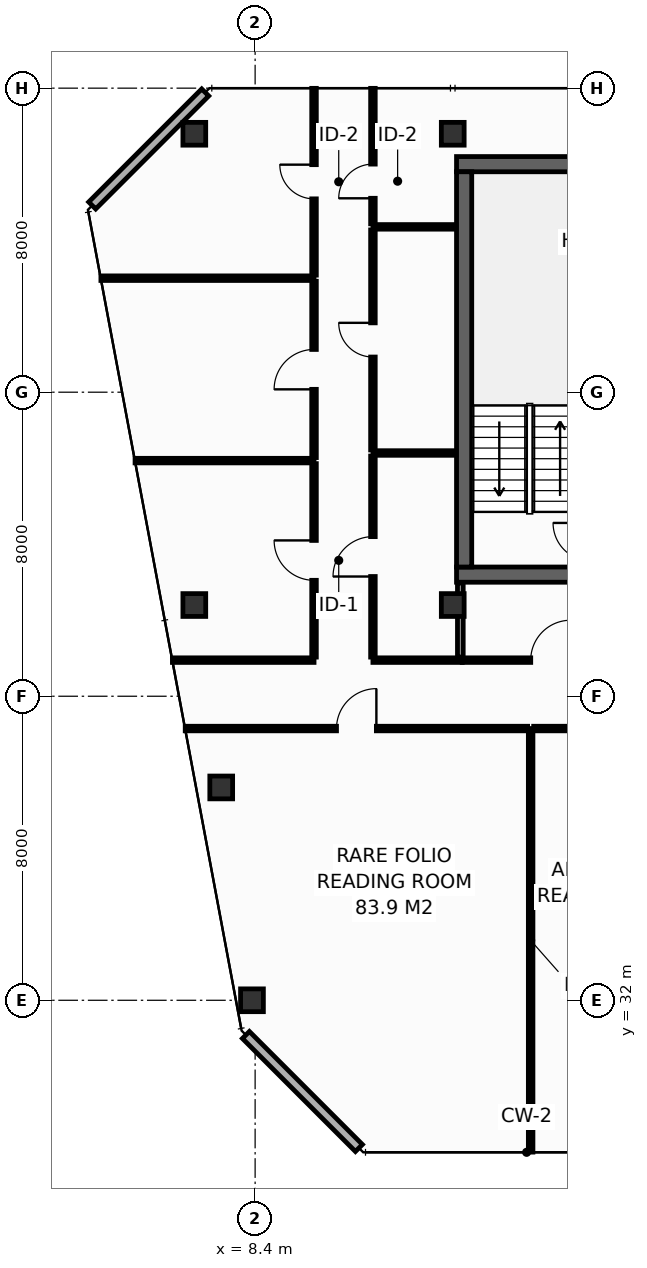
"""IFC4 building model, lengths in metres.
Left out: names, types, materials, properties, quantities, classifications, styles, units other than length and angle.
Written with IfcOpenShell. Run it as: python <this file> out.ifc"""

import sys

from ifc_helpers import new_model, si_unit, direction, frame, frame_2d, origin, origin_2d, place, context, subcontext, project, spatial, rectangle, hollow_rectangle, extrude, element, fill, save


model = new_model("IFC4")
c1 = context("Model", 3, precision=1e-05, world=origin(), true_north=direction((0.0, 1.0)))
c2 = subcontext(c1, "Body", "Model", "MODEL_VIEW")
j1 = project(units=[si_unit("LENGTHUNIT", "METRE"), si_unit("PLANEANGLEUNIT", "RADIAN")], contexts=[c1])
p1 = place(None, origin())
s1 = spatial("IfcSite", under=j1, at=p1, CompositionType="ELEMENT")
p2 = place(p1, origin())
s2 = spatial("IfcBuilding", under=s1, at=p2, CompositionType="ELEMENT")
p3 = place(p2, frame((0.0, 0.0, 283.8)))
s3 = spatial("IfcBuildingStorey", under=s2, at=p3, CompositionType="ELEMENT", Elevation=283.8)
p4 = place(p3, frame((13.7, 43.2, 0.0), z_axis=(0.0, 0.0, 1.0), x_axis=(1.0, 0.0, 0.0)))
e1 = element("IfcWall", 1, at=p4, inside=s3, PredefinedType="SHEAR", context=c2, shape_type="SweptSolid", body=[
    extrude(rectangle(XDim=32.5, YDim=0.4, at=frame_2d((16.25, 0.0))), origin(), (0.0, 0.0, 1.0), 3.55),
])
p5 = place(p4, frame((5.4, 0.0, 0.0)))
e2 = element("IfcOpeningElement", 2, at=p5, cuts=e1, PredefinedType="OPENING", context=c2, shape_type="SweptSolid", body=[
    extrude(rectangle(XDim=1.1, YDim=2.15, at=frame_2d((0.55, 1.075))), frame((0.0, 0.21, 0.0), z_axis=(0.0, -1.0, 0.0), x_axis=(1.0, 0.0, 0.0)), (0.0, 0.0, 1.0), 0.42),
])
p6 = place(p4, frame((25.6, 0.0, 0.0)))
e3 = element("IfcOpeningElement", 3, at=p6, cuts=e1, PredefinedType="OPENING", context=c2, shape_type="SweptSolid", body=[
    extrude(rectangle(XDim=1.1, YDim=2.15, at=frame_2d((0.55, 1.075))), frame((0.0, 0.21, 0.0), z_axis=(0.0, -1.0, 0.0), x_axis=(1.0, 0.0, 0.0)), (0.0, 0.0, 1.0), 0.42),
])
p7 = place(p3, frame((13.7, 54.0, 0.0), z_axis=(0.0, 0.0, 1.0), x_axis=(1.0, 0.0, 0.0)))
e4 = element("IfcWall", 4, at=p7, inside=s3, PredefinedType="SHEAR", context=c2, shape_type="SweptSolid", body=[
    extrude(rectangle(XDim=32.5, YDim=0.4, at=frame_2d((16.25, 0.0))), origin(), (0.0, 0.0, 1.0), 3.55),
])
p8 = place(p3, frame((13.9, 43.4, 0.0), z_axis=(0.0, 0.0, 1.0), x_axis=(0.0, 1.0, 0.0)))
e5 = element("IfcWall", 5, at=p8, inside=s3, PredefinedType="SHEAR", context=c2, shape_type="SweptSolid", body=[
    extrude(rectangle(XDim=10.4, YDim=0.4, at=frame_2d((5.2, 0.0))), origin(), (0.0, 0.0, 1.0), 3.55),
])
for number, where, z_axis, x_axis in (
    (6, (6.8, 54.8, 0.0), (0.0, 0.0, 1.0), (1.0, 0.0, 0.0)),
    (7, (13.6, 54.8, 0.0), (0.0, 0.0, 1.0), (1.0, 0.0, 0.0)),
    (8, (6.8, 42.4, 0.0), (0.0, 0.0, 1.0), (1.0, 0.0, 0.0)),
    (9, (13.6, 42.4, 0.0), (0.0, 0.0, 1.0), (1.0, 0.0, 0.0)),
    (10, (8.317, 32.0, 0.0), (0.0, 0.0, 1.0), (1.0, 0.0, 0.0)),
    (11, (7.508, 37.6, 0.0), (0.0, 0.0, 1.0), (1.0, 0.0, 0.0)),
):
    element("IfcColumn", number, at=place(p3, frame(where, z_axis=z_axis, x_axis=x_axis)), inside=s3, PredefinedType="COLUMN", context=c2, shape_type="SweptSolid", body=[
        extrude(hollow_rectangle(XDim=0.6, YDim=0.6, WallThickness=0.028, at=origin_2d()), origin(), (0.0, 0.0, 1.0), 3.8),
    ])
for number, where, z_axis, x_axis in (
    (12, (8.157, 31.087, 0.0), (0.0, 0.0, 1.0), (0.707, -0.707, 0.0)),
    (13, (7.087, 55.887, 0.0), (0.0, 0.0, 1.0), (-0.707, -0.707, 0.0)),
):
    element("IfcWall", number, at=place(p3, frame(where, z_axis=z_axis, x_axis=x_axis)), inside=s3, PredefinedType="STANDARD", context=c2, shape_type="SweptSolid", body=[
        extrude(rectangle(XDim=4.206, YDim=0.26, at=frame_2d((2.103, 0.0))), origin(), (0.0, 0.0, 1.0), 3.55),
    ])
p9 = place(p3, frame((6.224, 40.95, 0.0), z_axis=(0.0, 0.0, 1.0), x_axis=(1.0, 0.0, 0.0)))
e14 = element("IfcWall", 14, at=p9, inside=s3, PredefinedType="PARTITIONING", context=c2, shape_type="SweptSolid", body=[
    extrude(rectangle(XDim=3.726, YDim=0.12, at=frame_2d((1.863, 0.0))), origin(), (0.0, 0.0, 1.0), 3.085),
])
p10 = place(p3, frame((11.5, 40.95, 0.0), z_axis=(0.0, 0.0, 1.0), x_axis=(1.0, 0.0, 0.0)))
e15 = element("IfcWall", 15, at=p10, inside=s3, PredefinedType="PARTITIONING", context=c2, shape_type="SweptSolid", body=[
    extrude(rectangle(XDim=2.35, YDim=0.12, at=frame_2d((1.175, 0.0))), origin(), (0.0, 0.0, 1.0), 3.55),
])
p11 = place(p3, frame((11.5, 52.35, 0.0), z_axis=(0.0, 0.0, 1.0), x_axis=(1.0, 0.0, 0.0)))
e16 = element("IfcWall", 16, at=p11, inside=s3, PredefinedType="PARTITIONING", context=c2, shape_type="SweptSolid", body=[
    extrude(rectangle(XDim=2.18, YDim=0.12, at=frame_2d((1.09, 0.0))), origin(), (0.0, 0.0, 1.0), 3.55),
])
p12 = place(p3, frame((11.5, 52.43, 0.0), z_axis=(0.0, 0.0, 1.0), x_axis=(0.0, 1.0, 0.0)))
e17 = element("IfcWall", 17, at=p12, inside=s3, PredefinedType="PARTITIONING", context=c2, shape_type="SweptSolid", body=[
    extrude(rectangle(XDim=3.565, YDim=0.12, at=frame_2d((1.783, 0.0))), origin(), (0.0, 0.0, 1.0), 2.935),
])
p13 = place(p12, frame((0.672, 0.0, 0.0)))
e18 = element("IfcOpeningElement", 18, at=p13, cuts=e17, PredefinedType="OPENING", context=c2, shape_type="SweptSolid", body=[
    extrude(rectangle(XDim=0.9, YDim=2.1, at=frame_2d((0.45, 1.05))), frame((0.0, 0.07, 0.0), z_axis=(0.0, -1.0, 0.0), x_axis=(1.0, 0.0, 0.0)), (0.0, 0.0, 1.0), 0.14),
])
p14 = place(p3, frame((5.241, 46.2, 0.0), z_axis=(0.0, 0.0, 1.0), x_axis=(1.0, 0.0, 0.0)))
e19 = element("IfcWall", 19, at=p14, inside=s3, PredefinedType="PARTITIONING", context=c2, shape_type="SweptSolid", body=[
    extrude(rectangle(XDim=4.709, YDim=0.12, at=frame_2d((2.354, 0.0))), origin(), (0.0, 0.0, 1.0), 2.947),
])
p15 = place(p3, frame((4.342, 51.0, 0.0), z_axis=(0.0, 0.0, 1.0), x_axis=(1.0, 0.0, 0.0)))
e20 = element("IfcWall", 20, at=p15, inside=s3, PredefinedType="PARTITIONING", context=c2, shape_type="SweptSolid", body=[
    extrude(rectangle(XDim=5.608, YDim=0.12, at=frame_2d((2.804, 0.0))), origin(), (0.0, 0.0, 1.0), 2.947),
])
p16 = place(p3, frame((9.95, 41.03, 0.0), z_axis=(0.0, 0.0, 1.0), x_axis=(0.0, 1.0, 0.0)))
e21 = element("IfcWall", 21, at=p16, inside=s3, PredefinedType="PARTITIONING", context=c2, shape_type="SweptSolid", body=[
    extrude(rectangle(XDim=5.09, YDim=0.12, at=frame_2d((2.545, 0.0))), origin(), (0.0, 0.0, 1.0), 2.947),
])
p17 = place(p16, frame((2.02, 0.0, 0.0)))
e22 = element("IfcOpeningElement", 22, at=p17, cuts=e21, PredefinedType="OPENING", context=c2, shape_type="SweptSolid", body=[
    extrude(rectangle(XDim=1.05, YDim=2.15, at=frame_2d((0.525, 1.075))), frame((0.0, 0.07, 0.0), z_axis=(0.0, -1.0, 0.0), x_axis=(1.0, 0.0, 0.0)), (0.0, 0.0, 1.0), 0.14),
])
p18 = place(p3, frame((9.95, 46.28, 0.0), z_axis=(0.0, 0.0, 1.0), x_axis=(0.0, 1.0, 0.0)))
e23 = element("IfcWall", 23, at=p18, inside=s3, PredefinedType="PARTITIONING", context=c2, shape_type="SweptSolid", body=[
    extrude(rectangle(XDim=4.64, YDim=0.12, at=frame_2d((2.32, 0.0))), origin(), (0.0, 0.0, 1.0), 3.55),
])
p19 = place(p18, frame((1.795, 0.0, 0.0)))
e24 = element("IfcOpeningElement", 24, at=p19, cuts=e23, PredefinedType="OPENING", context=c2, shape_type="SweptSolid", body=[
    extrude(rectangle(XDim=1.05, YDim=2.15, at=frame_2d((0.525, 1.075))), frame((0.0, 0.07, 0.0), z_axis=(0.0, -1.0, 0.0), x_axis=(1.0, 0.0, 0.0)), (0.0, 0.0, 1.0), 0.14),
])
p20 = place(p3, frame((9.95, 51.08, 0.0), z_axis=(0.0, 0.0, 1.0), x_axis=(0.0, 1.0, 0.0)))
e25 = element("IfcWall", 25, at=p20, inside=s3, PredefinedType="PARTITIONING", context=c2, shape_type="SweptSolid", body=[
    extrude(rectangle(XDim=4.915, YDim=0.12, at=frame_2d((2.458, 0.0))), origin(), (0.0, 0.0, 1.0), 2.935),
])
p21 = place(p20, frame((2.007, 0.0, 0.0)))
e26 = element("IfcOpeningElement", 26, at=p21, cuts=e25, PredefinedType="OPENING", context=c2, shape_type="SweptSolid", body=[
    extrude(rectangle(XDim=0.9, YDim=2.1, at=frame_2d((0.45, 1.05))), frame((0.0, 0.07, 0.0), z_axis=(0.0, -1.0, 0.0), x_axis=(1.0, 0.0, 0.0)), (0.0, 0.0, 1.0), 0.14),
])
p22 = place(p3, frame((11.5, 46.4, 0.0), z_axis=(0.0, 0.0, 1.0), x_axis=(1.0, 0.0, 0.0)))
e27 = element("IfcWall", 27, at=p22, inside=s3, PredefinedType="PARTITIONING", context=c2, shape_type="SweptSolid", body=[
    extrude(rectangle(XDim=2.18, YDim=0.12, at=frame_2d((1.09, 0.0))), origin(), (0.0, 0.0, 1.0), 3.55),
])
p23 = place(p3, frame((11.5, 41.03, 0.0), z_axis=(0.0, 0.0, 1.0), x_axis=(0.0, 1.0, 0.0)))
e28 = element("IfcWall", 28, at=p23, inside=s3, PredefinedType="PARTITIONING", context=c2, shape_type="SweptSolid", body=[
    extrude(rectangle(XDim=5.29, YDim=0.12, at=frame_2d((2.645, 0.0))), origin(), (0.0, 0.0, 1.0), 2.947),
])
p24 = place(p23, frame((2.12, 0.0, 0.0)))
e29 = element("IfcOpeningElement", 29, at=p24, cuts=e28, PredefinedType="OPENING", context=c2, shape_type="SweptSolid", body=[
    extrude(rectangle(XDim=1.05, YDim=2.15, at=frame_2d((0.525, 1.075))), frame((0.0, 0.07, 0.0), z_axis=(0.0, -1.0, 0.0), x_axis=(1.0, 0.0, 0.0)), (0.0, 0.0, 1.0), 0.14),
])
p25 = place(p3, frame((11.5, 46.48, 0.0), z_axis=(0.0, 0.0, 1.0), x_axis=(0.0, 1.0, 0.0)))
e30 = element("IfcWall", 30, at=p25, inside=s3, PredefinedType="PARTITIONING", context=c2, shape_type="SweptSolid", body=[
    extrude(rectangle(XDim=5.79, YDim=0.12, at=frame_2d((2.895, 0.0))), origin(), (0.0, 0.0, 1.0), 3.55),
])
p26 = place(p25, frame((2.445, 0.0, 0.0)))
e31 = element("IfcOpeningElement", 31, at=p26, cuts=e30, PredefinedType="OPENING", context=c2, shape_type="SweptSolid", body=[
    extrude(rectangle(XDim=0.9, YDim=2.1, at=frame_2d((0.45, 1.05))), frame((0.0, 0.07, 0.0), z_axis=(0.0, -1.0, 0.0), x_axis=(1.0, 0.0, 0.0)), (0.0, 0.0, 1.0), 0.14),
])
p27 = place(p3, frame((13.8, 41.03, 0.0), z_axis=(0.0, 0.0, 1.0), x_axis=(0.0, 1.0, 0.0)))
e32 = element("IfcWall", 32, at=p27, inside=s3, PredefinedType="PARTITIONING", context=c2, shape_type="SweptSolid", body=[
    extrude(rectangle(XDim=1.95, YDim=0.15, at=frame_2d((0.975, 0.0))), origin(), (0.0, 0.0, 1.0), 3.55),
])
p28 = place(p3, frame((13.85, 40.95, 0.0), z_axis=(0.0, 0.0, 1.0), x_axis=(1.0, 0.0, 0.0)))
e33 = element("IfcWall", 33, at=p28, inside=s3, PredefinedType="PARTITIONING", context=c2, shape_type="SweptSolid", body=[
    extrude(rectangle(XDim=4.655, YDim=0.12, at=frame_2d((2.327, 0.0))), origin(), (0.0, 0.0, 1.0), 3.55),
])
p29 = place(p28, frame((1.802, 0.0, 0.0)))
e34 = element("IfcOpeningElement", 34, at=p29, cuts=e33, PredefinedType="OPENING", context=c2, shape_type="SweptSolid", body=[
    extrude(rectangle(XDim=1.05, YDim=2.15, at=frame_2d((0.525, 1.075))), frame((0.0, 0.07, 0.0), z_axis=(0.0, -1.0, 0.0), x_axis=(1.0, 0.0, 0.0)), (0.0, 0.0, 1.0), 0.14),
])
p30 = place(p3, frame((15.65, 28.005, 0.0), z_axis=(0.0, 0.0, 1.0), x_axis=(0.0, 1.0, 0.0)))
e35 = element("IfcWall", 35, at=p30, inside=s3, PredefinedType="PARTITIONING", context=c2, shape_type="SweptSolid", body=[
    extrude(rectangle(XDim=11.145, YDim=0.12, at=frame_2d((5.573, 0.0))), origin(), (0.0, 0.0, 1.0), 3.047),
])
p31 = place(p3, frame((6.561, 39.15, 0.0), z_axis=(0.0, 0.0, 1.0), x_axis=(1.0, 0.0, 0.0)))
e36 = element("IfcWall", 36, at=p31, inside=s3, PredefinedType="PARTITIONING", context=c2, shape_type="SweptSolid", body=[
    extrude(rectangle(XDim=9.009, YDim=0.12, at=frame_2d((4.505, 0.0))), origin(), (0.0, 0.0, 1.0), 3.085),
])
p32 = place(p31, frame((3.98, 0.0, 0.0)))
e37 = element("IfcOpeningElement", 37, at=p32, cuts=e36, PredefinedType="OPENING", context=c2, shape_type="SweptSolid", body=[
    extrude(rectangle(XDim=1.05, YDim=2.15, at=frame_2d((0.525, 1.075))), frame((0.0, 0.07, 0.0), z_axis=(0.0, -1.0, 0.0), x_axis=(1.0, 0.0, 0.0)), (0.0, 0.0, 1.0), 0.14),
])
p33 = place(p3, frame((15.73, 39.15, 0.0), z_axis=(0.0, 0.0, 1.0), x_axis=(1.0, 0.0, 0.0)))
e38 = element("IfcWall", 38, at=p33, inside=s3, PredefinedType="PARTITIONING", context=c2, shape_type="SweptSolid", body=[
    extrude(rectangle(XDim=6.502, YDim=0.12, at=frame_2d((3.251, 0.0))), origin(), (0.0, 0.0, 1.0), 3.047),
])
p34 = place(p33, frame((2.726, 0.0, 0.0)))
e39 = element("IfcOpeningElement", 39, at=p34, cuts=e38, PredefinedType="OPENING", context=c2, shape_type="SweptSolid", body=[
    extrude(rectangle(XDim=1.05, YDim=2.15, at=frame_2d((0.525, 1.075))), frame((0.0, 0.07, 0.0), z_axis=(0.0, -1.0, 0.0), x_axis=(1.0, 0.0, 0.0)), (0.0, 0.0, 1.0), 0.14),
])
p35 = place(p13, origin())
e40 = element("IfcDoor", 40, at=p35, inside=s3, OperationType="SINGLE_SWING_LEFT", PredefinedType="DOOR", context=c2, shape_type="SweptSolid", body=[
    extrude(rectangle(XDim=0.9, YDim=2.1, at=frame_2d((0.45, 1.05))), frame((0.0, 0.025, 0.0), z_axis=(0.0, -1.0, 0.0), x_axis=(1.0, 0.0, 0.0)), (0.0, 0.0, 1.0), 0.05),
])
fill(e18, e40)
p36 = place(p17, origin())
e41 = element("IfcDoor", 41, at=p36, inside=s3, OperationType="SINGLE_SWING_RIGHT", PredefinedType="DOOR", context=c2, shape_type="SweptSolid", body=[
    extrude(rectangle(XDim=1.05, YDim=2.15, at=frame_2d((0.525, 1.075))), frame((0.0, 0.025, 0.0), z_axis=(0.0, -1.0, 0.0), x_axis=(1.0, 0.0, 0.0)), (0.0, 0.0, 1.0), 0.05),
])
fill(e22, e41)
p37 = place(p19, origin())
e42 = element("IfcDoor", 42, at=p37, inside=s3, OperationType="SINGLE_SWING_LEFT", PredefinedType="DOOR", context=c2, shape_type="SweptSolid", body=[
    extrude(rectangle(XDim=1.05, YDim=2.15, at=frame_2d((0.525, 1.075))), frame((0.0, 0.025, 0.0), z_axis=(0.0, -1.0, 0.0), x_axis=(1.0, 0.0, 0.0)), (0.0, 0.0, 1.0), 0.05),
])
fill(e24, e42)
p38 = place(p21, origin())
e43 = element("IfcDoor", 43, at=p38, inside=s3, OperationType="SINGLE_SWING_RIGHT", PredefinedType="DOOR", context=c2, shape_type="SweptSolid", body=[
    extrude(rectangle(XDim=0.9, YDim=2.1, at=frame_2d((0.45, 1.05))), frame((0.0, 0.025, 0.0), z_axis=(0.0, -1.0, 0.0), x_axis=(1.0, 0.0, 0.0)), (0.0, 0.0, 1.0), 0.05),
])
fill(e26, e43)
p39 = place(p24, origin())
e44 = element("IfcDoor", 44, at=p39, inside=s3, OperationType="SINGLE_SWING_LEFT", PredefinedType="DOOR", context=c2, shape_type="SweptSolid", body=[
    extrude(rectangle(XDim=1.05, YDim=2.15, at=frame_2d((0.525, 1.075))), frame((0.0, 0.025, 0.0), z_axis=(0.0, -1.0, 0.0), x_axis=(1.0, 0.0, 0.0)), (0.0, 0.0, 1.0), 0.05),
])
fill(e29, e44)
p40 = place(p26, origin())
e45 = element("IfcDoor", 45, at=p40, inside=s3, OperationType="SINGLE_SWING_RIGHT", PredefinedType="DOOR", context=c2, shape_type="SweptSolid", body=[
    extrude(rectangle(XDim=0.9, YDim=2.1, at=frame_2d((0.45, 1.05))), frame((0.0, 0.025, 0.0), z_axis=(0.0, -1.0, 0.0), x_axis=(1.0, 0.0, 0.0)), (0.0, 0.0, 1.0), 0.05),
])
fill(e31, e45)
p41 = place(p29, origin())
e46 = element("IfcDoor", 46, at=p41, inside=s3, OperationType="SINGLE_SWING_RIGHT", PredefinedType="DOOR", context=c2, shape_type="SweptSolid", body=[
    extrude(rectangle(XDim=1.05, YDim=2.15, at=frame_2d((0.525, 1.075))), frame((0.0, 0.025, 0.0), z_axis=(0.0, -1.0, 0.0), x_axis=(1.0, 0.0, 0.0)), (0.0, 0.0, 1.0), 0.05),
])
fill(e34, e46)
p42 = place(p32, origin())
e47 = element("IfcDoor", 47, at=p42, inside=s3, OperationType="SINGLE_SWING_RIGHT", PredefinedType="DOOR", context=c2, shape_type="SweptSolid", body=[
    extrude(rectangle(XDim=1.05, YDim=2.15, at=frame_2d((0.525, 1.075))), frame((0.0, 0.025, 0.0), z_axis=(0.0, -1.0, 0.0), x_axis=(1.0, 0.0, 0.0)), (0.0, 0.0, 1.0), 0.05),
])
fill(e37, e47)
save(model, sys.argv[1])
